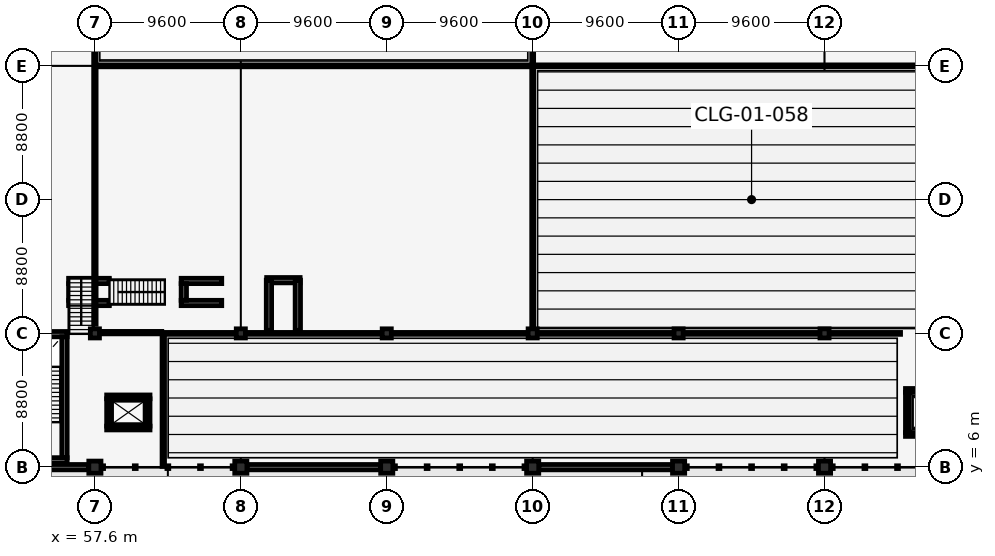
"""IFC4 building model, lengths in metres.
Left out: names, types, materials, properties, quantities, classifications, styles, units other than length and angle.
Written with IfcOpenShell. Run it as: python <this file> out.ifc"""

import sys

from ifc_helpers import new_model, si_unit, direction, frame, frame_2d, origin, origin_2d, place, context, subcontext, project, spatial, rectangle, extrude, element, fill, save


model = new_model("IFC4")
c1 = context("Model", 3, precision=1e-05, world=origin(), true_north=direction((0.0, 1.0)))
c2 = subcontext(c1, "Body", "Model", "MODEL_VIEW")
j1 = project(units=[si_unit("LENGTHUNIT", "METRE"), si_unit("PLANEANGLEUNIT", "RADIAN")], contexts=[c1])
p1 = place(None, origin())
s1 = spatial("IfcSite", under=j1, at=p1, CompositionType="ELEMENT")
p2 = place(p1, origin())
s2 = spatial("IfcBuilding", under=s1, at=p2, CompositionType="ELEMENT")
p3 = place(p2, origin())
s3 = spatial("IfcBuildingStorey", under=s2, at=p3, CompositionType="ELEMENT", Elevation=0.0)
p4 = place(p3, frame((57.6, 6.0, 0.0), z_axis=(0.0, 0.0, 1.0), x_axis=(1.0, 0.0, 0.0)))
e1 = element("IfcColumn", 1, at=p4, inside=s3, PredefinedType="COLUMN", context=c2, shape_type="SweptSolid", body=[
    extrude(rectangle(XDim=0.8, YDim=0.8, at=origin_2d()), origin(), (0.0, 0.0, 1.0), 4.8),
])
p5 = place(p3, frame((57.6, 14.8, 0.0), z_axis=(0.0, 0.0, 1.0), x_axis=(1.0, 0.0, 0.0)))
e2 = element("IfcColumn", 2, at=p5, inside=s3, PredefinedType="COLUMN", context=c2, shape_type="SweptSolid", body=[
    extrude(rectangle(XDim=0.6, YDim=0.6, at=origin_2d()), origin(), (0.0, 0.0, 1.0), 4.8),
])
p6 = place(p3, frame((67.2, 6.0, 0.0), z_axis=(0.0, 0.0, 1.0), x_axis=(1.0, 0.0, 0.0)))
e3 = element("IfcColumn", 3, at=p6, inside=s3, PredefinedType="COLUMN", context=c2, shape_type="SweptSolid", body=[
    extrude(rectangle(XDim=0.8, YDim=0.8, at=origin_2d()), origin(), (0.0, 0.0, 1.0), 4.8),
])
p7 = place(p3, frame((67.2, 14.8, 0.0), z_axis=(0.0, 0.0, 1.0), x_axis=(1.0, 0.0, 0.0)))
e4 = element("IfcColumn", 4, at=p7, inside=s3, PredefinedType="COLUMN", context=c2, shape_type="SweptSolid", body=[
    extrude(rectangle(XDim=0.6, YDim=0.6, at=origin_2d()), origin(), (0.0, 0.0, 1.0), 4.8),
])
p8 = place(p3, frame((76.8, 6.0, 0.0), z_axis=(0.0, 0.0, 1.0), x_axis=(1.0, 0.0, 0.0)))
e5 = element("IfcColumn", 5, at=p8, inside=s3, PredefinedType="COLUMN", context=c2, shape_type="SweptSolid", body=[
    extrude(rectangle(XDim=0.8, YDim=0.8, at=origin_2d()), origin(), (0.0, 0.0, 1.0), 4.8),
])
p9 = place(p3, frame((76.8, 14.8, 0.0), z_axis=(0.0, 0.0, 1.0), x_axis=(1.0, 0.0, 0.0)))
e6 = element("IfcColumn", 6, at=p9, inside=s3, PredefinedType="COLUMN", context=c2, shape_type="SweptSolid", body=[
    extrude(rectangle(XDim=0.6, YDim=0.6, at=origin_2d()), origin(), (0.0, 0.0, 1.0), 4.8),
])
p10 = place(p3, frame((86.4, 6.0, 0.0), z_axis=(0.0, 0.0, 1.0), x_axis=(1.0, 0.0, 0.0)))
e7 = element("IfcColumn", 7, at=p10, inside=s3, PredefinedType="COLUMN", context=c2, shape_type="SweptSolid", body=[
    extrude(rectangle(XDim=0.8, YDim=0.8, at=origin_2d()), origin(), (0.0, 0.0, 1.0), 4.8),
])
p11 = place(p3, frame((86.4, 14.8, 0.0), z_axis=(0.0, 0.0, 1.0), x_axis=(1.0, 0.0, 0.0)))
e8 = element("IfcColumn", 8, at=p11, inside=s3, PredefinedType="COLUMN", context=c2, shape_type="SweptSolid", body=[
    extrude(rectangle(XDim=0.6, YDim=0.6, at=origin_2d()), origin(), (0.0, 0.0, 1.0), 4.8),
])
p12 = place(p3, frame((96.0, 6.0, 0.0), z_axis=(0.0, 0.0, 1.0), x_axis=(1.0, 0.0, 0.0)))
e9 = element("IfcColumn", 9, at=p12, inside=s3, PredefinedType="COLUMN", context=c2, shape_type="SweptSolid", body=[
    extrude(rectangle(XDim=0.8, YDim=0.8, at=origin_2d()), origin(), (0.0, 0.0, 1.0), 4.8),
])
p13 = place(p3, frame((96.0, 14.8, 0.0), z_axis=(0.0, 0.0, 1.0), x_axis=(1.0, 0.0, 0.0)))
e10 = element("IfcColumn", 10, at=p13, inside=s3, PredefinedType="COLUMN", context=c2, shape_type="SweptSolid", body=[
    extrude(rectangle(XDim=0.6, YDim=0.6, at=origin_2d()), origin(), (0.0, 0.0, 1.0), 4.8),
])
p14 = place(p3, frame((105.6, 6.0, 0.0), z_axis=(0.0, 0.0, 1.0), x_axis=(1.0, 0.0, 0.0)))
e11 = element("IfcColumn", 11, at=p14, inside=s3, PredefinedType="COLUMN", context=c2, shape_type="SweptSolid", body=[
    extrude(rectangle(XDim=0.8, YDim=0.8, at=origin_2d()), origin(), (0.0, 0.0, 1.0), 4.8),
])
p15 = place(p3, frame((105.6, 14.8, 0.0), z_axis=(0.0, 0.0, 1.0), x_axis=(1.0, 0.0, 0.0)))
e12 = element("IfcColumn", 12, at=p15, inside=s3, PredefinedType="COLUMN", context=c2, shape_type="SweptSolid", body=[
    extrude(rectangle(XDim=0.6, YDim=0.6, at=origin_2d()), origin(), (0.0, 0.0, 1.0), 4.8),
])
p16 = place(p3, frame((48.4, 6.0, 0.0), z_axis=(0.0, 0.0, 1.0), x_axis=(1.0, 0.0, 0.0)))
e13 = element("IfcWall", 13, at=p16, inside=s3, PredefinedType="SOLIDWALL", context=c2, shape_type="SweptSolid", body=[
    extrude(rectangle(XDim=8.8, YDim=0.35, at=frame_2d((4.4, 0.0))), origin(), (0.0, 0.0, 1.0), 4.1),
])
p17 = place(p16, frame((3.2, 0.0, 1.0)))
e14 = element("IfcOpeningElement", 14, at=p17, cuts=e13, PredefinedType="OPENING", context=c2, shape_type="SweptSolid", body=[
    extrude(rectangle(XDim=2.06, YDim=1.97, at=frame_2d((1.03, 0.985))), frame((0.0, 0.185, 0.0), z_axis=(0.0, -1.0, 0.0), x_axis=(1.0, 0.0, 0.0)), (0.0, 0.0, 1.0), 0.37),
])
p18 = place(p3, frame((67.6, 6.0, 0.0), z_axis=(0.0, 0.0, 1.0), x_axis=(1.0, 0.0, 0.0)))
e15 = element("IfcWall", 15, at=p18, inside=s3, PredefinedType="SOLIDWALL", context=c2, shape_type="SweptSolid", body=[
    extrude(rectangle(XDim=8.8, YDim=0.35, at=frame_2d((4.4, 0.0))), origin(), (0.0, 0.0, 1.0), 4.1),
])
p19 = place(p18, frame((1.4, 0.0, 0.0)))
e16 = element("IfcOpeningElement", 16, at=p19, cuts=e15, PredefinedType="OPENING", context=c2, shape_type="SweptSolid", body=[
    extrude(rectangle(XDim=1.88, YDim=2.31, at=frame_2d((0.94, 1.155))), frame((0.0, 0.185, 0.0), z_axis=(0.0, -1.0, 0.0), x_axis=(1.0, 0.0, 0.0)), (0.0, 0.0, 1.0), 0.37),
])
p20 = place(p18, frame((4.8, 0.0, 0.0)))
e17 = element("IfcOpeningElement", 17, at=p20, cuts=e15, PredefinedType="OPENING", context=c2, shape_type="SweptSolid", body=[
    extrude(rectangle(XDim=2.0, YDim=2.4, at=frame_2d((1.0, 1.2))), frame((0.0, 0.185, 0.0), z_axis=(0.0, -1.0, 0.0), x_axis=(1.0, 0.0, 0.0)), (0.0, 0.0, 1.0), 0.37),
])
p21 = place(p3, frame((86.8, 6.0, 0.0), z_axis=(0.0, 0.0, 1.0), x_axis=(1.0, 0.0, 0.0)))
e18 = element("IfcWall", 18, at=p21, inside=s3, PredefinedType="SOLIDWALL", context=c2, shape_type="SweptSolid", body=[
    extrude(rectangle(XDim=8.8, YDim=0.35, at=frame_2d((4.4, 0.0))), origin(), (0.0, 0.0, 1.0), 4.1),
])
p22 = place(p21, frame((1.4, 0.0, 0.0)))
e19 = element("IfcOpeningElement", 19, at=p22, cuts=e18, PredefinedType="OPENING", context=c2, shape_type="SweptSolid", body=[
    extrude(rectangle(XDim=1.88, YDim=2.31, at=frame_2d((0.94, 1.155))), frame((0.0, 0.185, 0.0), z_axis=(0.0, -1.0, 0.0), x_axis=(1.0, 0.0, 0.0)), (0.0, 0.0, 1.0), 0.37),
])
p23 = place(p21, frame((4.8, 0.0, 0.0)))
e20 = element("IfcOpeningElement", 20, at=p23, cuts=e18, PredefinedType="OPENING", context=c2, shape_type="SweptSolid", body=[
    extrude(rectangle(XDim=2.0, YDim=2.4, at=frame_2d((1.0, 1.2))), frame((0.0, 0.185, 0.0), z_axis=(0.0, -1.0, 0.0), x_axis=(1.0, 0.0, 0.0)), (0.0, 0.0, 1.0), 0.37),
])
for number, where, z_axis, x_axis in (
    (21, (55.775, 6.45, 0.0), (0.0, 0.0, 1.0), (-1.0, 0.0, 0.0)),
    (22, (50.125, 14.75, 0.0), (0.0, 0.0, 1.0), (1.0, 0.0, 0.0)),
):
    element("IfcWall", number, at=place(p3, frame(where, z_axis=z_axis, x_axis=x_axis)), inside=s3, PredefinedType="SHEAR", context=c2, shape_type="SweptSolid", body=[
        extrude(rectangle(XDim=5.65, YDim=0.35, at=frame_2d((2.825, 0.0))), origin(), (0.0, 0.0, 1.0), 4.55),
    ])
p24 = place(p3, frame((55.6, 14.575, 0.0), z_axis=(0.0, 0.0, 1.0), x_axis=(0.0, -1.0, 0.0)))
e23 = element("IfcWall", 23, at=p24, inside=s3, PredefinedType="SHEAR", context=c2, shape_type="SweptSolid", body=[
    extrude(rectangle(XDim=7.95, YDim=0.35, at=frame_2d((3.975, 0.0))), origin(), (0.0, 0.0, 1.0), 4.55),
])
p25 = place(p24, frame((5.68, 0.0, 0.0)))
e24 = element("IfcOpeningElement", 24, at=p25, cuts=e23, PredefinedType="OPENING", context=c2, shape_type="SweptSolid", body=[
    extrude(rectangle(XDim=2.05, YDim=2.15, at=frame_2d((1.025, 1.075))), frame((0.0, 0.185, 0.0), z_axis=(0.0, -1.0, 0.0), x_axis=(1.0, 0.0, 0.0)), (0.0, 0.0, 1.0), 0.37),
])
for number, where, z_axis, x_axis in (
    (25, (55.875, 16.8, 0.0), (0.0, 0.0, 1.0), (1.0, 0.0, 0.0)),
    (26, (55.875, 18.25, 0.0), (0.0, 0.0, 1.0), (1.0, 0.0, 0.0)),
):
    element("IfcWall", number, at=place(p3, frame(where, z_axis=z_axis, x_axis=x_axis)), inside=s3, PredefinedType="SHEAR", context=c2, shape_type="SweptSolid", body=[
        extrude(rectangle(XDim=2.67, YDim=0.35, at=frame_2d((1.335, 0.0))), origin(), (0.0, 0.0, 1.0), 2.205),
    ])
p26 = place(p3, frame((56.05, 16.975, 0.0), z_axis=(0.0, 0.0, 1.0), x_axis=(0.0, 1.0, 0.0)))
e27 = element("IfcWall", 27, at=p26, inside=s3, PredefinedType="SHEAR", context=c2, shape_type="SweptSolid", body=[
    extrude(rectangle(XDim=1.1, YDim=0.35, at=frame_2d((0.55, 0.0))), origin(), (0.0, 0.0, 1.0), 2.205),
])
for number, where, z_axis, x_axis in (
    (28, (63.275, 16.8, 0.0), (0.0, 0.0, 1.0), (1.0, 0.0, 0.0)),
    (29, (63.275, 18.25, 0.0), (0.0, 0.0, 1.0), (1.0, 0.0, 0.0)),
):
    element("IfcWall", number, at=place(p3, frame(where, z_axis=z_axis, x_axis=x_axis)), inside=s3, PredefinedType="SHEAR", context=c2, shape_type="SweptSolid", body=[
        extrude(rectangle(XDim=2.67, YDim=0.35, at=frame_2d((1.335, 0.0))), origin(), (0.0, 0.0, 1.0), 4.8),
    ])
p27 = place(p3, frame((63.45, 16.975, 0.0), z_axis=(0.0, 0.0, 1.0), x_axis=(0.0, 1.0, 0.0)))
e30 = element("IfcWall", 30, at=p27, inside=s3, PredefinedType="SHEAR", context=c2, shape_type="SweptSolid", body=[
    extrude(rectangle(XDim=1.1, YDim=0.35, at=frame_2d((0.55, 0.0))), origin(), (0.0, 0.0, 1.0), 4.8),
])
p28 = place(p3, frame((68.9, 18.3, 0.0), z_axis=(0.0, 0.0, 1.0), x_axis=(1.0, 0.0, 0.0)))
e31 = element("IfcWall", 31, at=p28, inside=s3, PredefinedType="SHEAR", context=c2, shape_type="SweptSolid", body=[
    extrude(rectangle(XDim=2.2, YDim=0.35, at=frame_2d((1.1, 0.0))), origin(), (0.0, 0.0, 1.0), 4.55),
])
for number, where, z_axis, x_axis in (
    (32, (69.05, 15.0, 0.0), (0.0, 0.0, 1.0), (0.0, 1.0, 0.0)),
    (33, (70.95, 15.0, 0.0), (0.0, 0.0, 1.0), (0.0, 1.0, 0.0)),
):
    element("IfcWall", number, at=place(p3, frame(where, z_axis=z_axis, x_axis=x_axis)), inside=s3, PredefinedType="SHEAR", context=c2, shape_type="SweptSolid", body=[
        extrude(rectangle(XDim=3.3, YDim=0.35, at=frame_2d((1.65, 0.0))), origin(), (0.0, 0.0, 1.0), 4.55),
    ])
p29 = place(p3, frame((61.225, 8.575, 0.0), z_axis=(0.0, 0.0, 1.0), x_axis=(-1.0, 0.0, 0.0)))
e34 = element("IfcWall", 34, at=p29, inside=s3, PredefinedType="SOLIDWALL", context=c2, shape_type="SweptSolid", body=[
    extrude(rectangle(XDim=2.85, YDim=0.25, at=frame_2d((1.425, 0.0))), origin(), (0.0, 0.0, 1.0), 4.55),
])
p30 = place(p3, frame((58.375, 10.625, 0.0), z_axis=(0.0, 0.0, 1.0), x_axis=(1.0, 0.0, 0.0)))
e35 = element("IfcWall", 35, at=p30, inside=s3, PredefinedType="SOLIDWALL", context=c2, shape_type="SweptSolid", body=[
    extrude(rectangle(XDim=2.85, YDim=0.25, at=frame_2d((1.425, 0.0))), origin(), (0.0, 0.0, 1.0), 4.55),
])
p31 = place(p30, frame((0.875, 0.0, 0.0)))
e36 = element("IfcOpeningElement", 36, at=p31, cuts=e35, PredefinedType="OPENING", context=c2, shape_type="SweptSolid", body=[
    extrude(rectangle(XDim=1.1, YDim=2.15, at=frame_2d((0.55, 1.075))), frame((0.0, 0.135, 0.0), z_axis=(0.0, -1.0, 0.0), x_axis=(1.0, 0.0, 0.0)), (0.0, 0.0, 1.0), 0.27),
])
for number, where, z_axis, x_axis in (
    (37, (58.5, 8.7, 0.0), (0.0, 0.0, 1.0), (0.0, 1.0, 0.0)),
    (38, (61.1, 10.5, 0.0), (0.0, 0.0, 1.0), (0.0, -1.0, 0.0)),
):
    element("IfcWall", number, at=place(p3, frame(where, z_axis=z_axis, x_axis=x_axis)), inside=s3, PredefinedType="SOLIDWALL", context=c2, shape_type="SweptSolid", body=[
        extrude(rectangle(XDim=1.8, YDim=0.25, at=frame_2d((0.9, 0.0))), origin(), (0.0, 0.0, 1.0), 4.55),
    ])
p32 = place(p3, frame((114.275, 8.15, 0.0), z_axis=(0.0, 0.0, 1.0), x_axis=(-1.0, 0.0, 0.0)))
e39 = element("IfcWall", 39, at=p32, inside=s3, PredefinedType="SOLIDWALL", context=c2, shape_type="SweptSolid", body=[
    extrude(rectangle(XDim=3.35, YDim=0.25, at=frame_2d((1.675, 0.0))), origin(), (0.0, 0.0, 1.0), 4.55),
])
p33 = place(p3, frame((110.925, 11.05, 0.0), z_axis=(0.0, 0.0, 1.0), x_axis=(1.0, 0.0, 0.0)))
e40 = element("IfcWall", 40, at=p33, inside=s3, PredefinedType="SOLIDWALL", context=c2, shape_type="SweptSolid", body=[
    extrude(rectangle(XDim=3.35, YDim=0.25, at=frame_2d((1.675, 0.0))), origin(), (0.0, 0.0, 1.0), 4.55),
])
p34 = place(p33, frame((0.775, 0.0, 0.0)))
e41 = element("IfcOpeningElement", 41, at=p34, cuts=e40, PredefinedType="OPENING", context=c2, shape_type="SweptSolid", body=[
    extrude(rectangle(XDim=1.8, YDim=2.3, at=frame_2d((0.9, 1.15))), frame((0.0, 0.135, 0.0), z_axis=(0.0, -1.0, 0.0), x_axis=(1.0, 0.0, 0.0)), (0.0, 0.0, 1.0), 0.27),
])
p35 = place(p3, frame((111.05, 8.275, 0.0), z_axis=(0.0, 0.0, 1.0), x_axis=(0.0, 1.0, 0.0)))
e42 = element("IfcWall", 42, at=p35, inside=s3, PredefinedType="SOLIDWALL", context=c2, shape_type="SweptSolid", body=[
    extrude(rectangle(XDim=2.65, YDim=0.25, at=frame_2d((1.325, 0.0))), origin(), (0.0, 0.0, 1.0), 4.55),
])
p36 = place(p3, frame((86.4, 14.9, 0.0), z_axis=(0.0, 0.0, 1.0), x_axis=(0.0, 1.0, 0.0)))
e43 = element("IfcWall", 43, at=p36, inside=s3, PredefinedType="PARTITIONING", context=c2, shape_type="SweptSolid", body=[
    extrude(rectangle(XDim=17.4, YDim=0.125, at=frame_2d((8.7, 0.0))), origin(), (0.0, 0.0, 1.0), 4.42),
])
p37 = place(p3, frame((57.7, 32.4, 0.0), z_axis=(0.0, 0.0, 1.0), x_axis=(1.0, 0.0, 0.0)))
e44 = element("IfcWall", 44, at=p37, inside=s3, PredefinedType="PARTITIONING", context=c2, shape_type="SweptSolid", body=[
    extrude(rectangle(XDim=28.6, YDim=0.125, at=frame_2d((14.3, 0.0))), origin(), (0.0, 0.0, 1.0), 4.42),
])
p38 = place(p3, frame((62.2, 14.8, 0.0), z_axis=(0.0, 0.0, 1.0), x_axis=(1.0, 0.0, 0.0)))
e45 = element("IfcWall", 45, at=p38, inside=s3, PredefinedType="PARTITIONING", context=c2, shape_type="SweptSolid", body=[
    extrude(rectangle(XDim=24.1, YDim=0.125, at=frame_2d((12.05, 0.0))), origin(), (0.0, 0.0, 1.0), 3.925),
])
p39 = place(p3, frame((57.6, 15.4, 0.0), z_axis=(0.0, 0.0, 1.0), x_axis=(0.0, 1.0, 0.0)))
e46 = element("IfcWall", 46, at=p39, inside=s3, PredefinedType="PARTITIONING", context=c2, shape_type="SweptSolid", body=[
    extrude(rectangle(XDim=16.9, YDim=0.16, at=frame_2d((8.45, 0.0))), origin(), (0.0, 0.0, 1.0), 4.42),
])
p40 = place(p39, frame((7.55, 0.0, 0.0)))
e47 = element("IfcOpeningElement", 47, at=p40, cuts=e46, PredefinedType="OPENING", context=c2, shape_type="SweptSolid", body=[
    extrude(rectangle(XDim=1.8, YDim=2.15, at=frame_2d((0.9, 1.075))), frame((0.0, 0.09, 0.0), z_axis=(0.0, -1.0, 0.0), x_axis=(1.0, 0.0, 0.0)), (0.0, 0.0, 1.0), 0.18),
])
p41 = place(p3, frame((57.7, 14.85, 0.0), z_axis=(0.0, 0.0, 1.0), x_axis=(1.0, 0.0, 0.0)))
e48 = element("IfcWall", 48, at=p41, inside=s3, PredefinedType="PARTITIONING", context=c2, shape_type="SweptSolid", body=[
    extrude(rectangle(XDim=4.3, YDim=0.16, at=frame_2d((2.15, 0.0))), origin(), (0.0, 0.0, 1.0), 3.925),
])
p42 = place(p41, frame((1.25, 0.0, 0.0)))
e49 = element("IfcOpeningElement", 49, at=p42, cuts=e48, PredefinedType="OPENING", context=c2, shape_type="SweptSolid", body=[
    extrude(rectangle(XDim=1.8, YDim=2.15, at=frame_2d((0.9, 1.075))), frame((0.0, 0.09, 0.0), z_axis=(0.0, -1.0, 0.0), x_axis=(1.0, 0.0, 0.0)), (0.0, 0.0, 1.0), 0.18),
])
p43 = place(p3, frame((86.5, 32.4, 0.0), z_axis=(0.0, 0.0, 1.0), x_axis=(1.0, 0.0, 0.0)))
e50 = element("IfcWall", 50, at=p43, inside=s3, PredefinedType="PARTITIONING", context=c2, shape_type="SweptSolid", body=[
    extrude(rectangle(XDim=28.65, YDim=0.125, at=frame_2d((14.325, 0.0))), origin(), (0.0, 0.0, 1.0), 4.42),
])
p44 = place(p3, frame((86.5, 14.8, 0.0), z_axis=(0.0, 0.0, 1.0), x_axis=(1.0, 0.0, 0.0)))
e51 = element("IfcWall", 51, at=p44, inside=s3, PredefinedType="PARTITIONING", context=c2, shape_type="SweptSolid", body=[
    extrude(rectangle(XDim=24.1, YDim=0.125, at=frame_2d((12.05, 0.0))), origin(), (0.0, 0.0, 1.0), 3.925),
])
p45 = place(p3, frame((86.4, 32.5, 0.0), z_axis=(0.0, 0.0, 1.0), x_axis=(0.0, 1.0, 0.0)))
e52 = element("IfcWall", 52, at=p45, inside=s3, PredefinedType="PARTITIONING", context=c2, shape_type="SweptSolid", body=[
    extrude(rectangle(XDim=17.45, YDim=0.125, at=frame_2d((8.725, 0.0))), origin(), (0.0, 0.0, 1.0), 4.42),
])
p46 = place(p3, frame((57.6, 32.5, 0.0), z_axis=(0.0, 0.0, 1.0), x_axis=(0.0, 1.0, 0.0)))
e53 = element("IfcWall", 53, at=p46, inside=s3, PredefinedType="PARTITIONING", context=c2, shape_type="SweptSolid", body=[
    extrude(rectangle(XDim=17.45, YDim=0.16, at=frame_2d((8.725, 0.0))), origin(), (0.0, 0.0, 1.0), 4.42),
])
p47 = place(p46, frame((7.825, 0.0, 0.0)))
e54 = element("IfcOpeningElement", 54, at=p47, cuts=e53, PredefinedType="OPENING", context=c2, shape_type="SweptSolid", body=[
    extrude(rectangle(XDim=1.8, YDim=2.15, at=frame_2d((0.9, 1.075))), frame((0.0, 0.09, 0.0), z_axis=(0.0, -1.0, 0.0), x_axis=(1.0, 0.0, 0.0)), (0.0, 0.0, 1.0), 0.18),
])
p48 = place(p3, frame((62.1, 6.05, 0.0), z_axis=(0.0, 0.0, 1.0), x_axis=(0.0, 1.0, 0.0)))
e55 = element("IfcWall", 55, at=p48, inside=s3, PredefinedType="PARTITIONING", context=c2, shape_type="SweptSolid", body=[
    extrude(rectangle(XDim=8.65, YDim=0.16, at=frame_2d((4.325, 0.0))), origin(), (0.0, 0.0, 1.0), 4.42),
])
p49 = place(p48, frame((3.732, 0.0, 0.0)))
e56 = element("IfcOpeningElement", 56, at=p49, cuts=e55, PredefinedType="OPENING", context=c2, shape_type="SweptSolid", body=[
    extrude(rectangle(XDim=1.8, YDim=2.15, at=frame_2d((0.9, 1.075))), frame((0.0, 0.09, 0.0), z_axis=(0.0, -1.0, 0.0), x_axis=(1.0, 0.0, 0.0)), (0.0, 0.0, 1.0), 0.18),
])
p50 = place(p19, origin())
e57 = element("IfcDoor", 57, at=p50, inside=s3, OperationType="DOUBLE_DOOR_SINGLE_SWING", PredefinedType="DOOR", context=c2, shape_type="SweptSolid", body=[
    extrude(rectangle(XDim=1.88, YDim=2.31, at=frame_2d((0.94, 1.155))), frame((0.0, 0.025, 0.0), z_axis=(0.0, -1.0, 0.0), x_axis=(1.0, 0.0, 0.0)), (0.0, 0.0, 1.0), 0.05),
])
fill(e16, e57)
p51 = place(p20, origin())
e58 = element("IfcDoor", 58, at=p51, inside=s3, OperationType="DOUBLE_DOOR_SINGLE_SWING", PredefinedType="DOOR", context=c2, shape_type="SweptSolid", body=[
    extrude(rectangle(XDim=2.0, YDim=2.4, at=frame_2d((1.0, 1.2))), frame((0.0, 0.025, 0.0), z_axis=(0.0, -1.0, 0.0), x_axis=(1.0, 0.0, 0.0)), (0.0, 0.0, 1.0), 0.05),
])
fill(e17, e58)
p52 = place(p22, origin())
e59 = element("IfcDoor", 59, at=p52, inside=s3, OperationType="DOUBLE_DOOR_SINGLE_SWING", PredefinedType="DOOR", context=c2, shape_type="SweptSolid", body=[
    extrude(rectangle(XDim=1.88, YDim=2.31, at=frame_2d((0.94, 1.155))), frame((0.0, 0.025, 0.0), z_axis=(0.0, -1.0, 0.0), x_axis=(1.0, 0.0, 0.0)), (0.0, 0.0, 1.0), 0.05),
])
fill(e19, e59)
p53 = place(p23, origin())
e60 = element("IfcDoor", 60, at=p53, inside=s3, OperationType="DOUBLE_DOOR_SINGLE_SWING", PredefinedType="DOOR", context=c2, shape_type="SweptSolid", body=[
    extrude(rectangle(XDim=2.0, YDim=2.4, at=frame_2d((1.0, 1.2))), frame((0.0, 0.025, 0.0), z_axis=(0.0, -1.0, 0.0), x_axis=(1.0, 0.0, 0.0)), (0.0, 0.0, 1.0), 0.05),
])
fill(e20, e60)
p54 = place(p25, origin())
e61 = element("IfcDoor", 61, at=p54, inside=s3, OperationType="DOUBLE_DOOR_SINGLE_SWING", PredefinedType="DOOR", context=c2, shape_type="SweptSolid", body=[
    extrude(rectangle(XDim=2.05, YDim=2.15, at=frame_2d((1.025, 1.075))), frame((0.0, 0.025, 0.0), z_axis=(0.0, -1.0, 0.0), x_axis=(1.0, 0.0, 0.0)), (0.0, 0.0, 1.0), 0.05),
])
fill(e24, e61)
p55 = place(p31, origin())
e62 = element("IfcDoor", 62, at=p55, inside=s3, OperationType="DOUBLE_DOOR_SLIDING", PredefinedType="DOOR", context=c2, shape_type="SweptSolid", body=[
    extrude(rectangle(XDim=1.1, YDim=2.15, at=frame_2d((0.55, 1.075))), frame((0.0, 0.025, 0.0), z_axis=(0.0, -1.0, 0.0), x_axis=(1.0, 0.0, 0.0)), (0.0, 0.0, 1.0), 0.05),
])
fill(e36, e62)
p56 = place(p40, origin())
e63 = element("IfcDoor", 63, at=p56, inside=s3, OperationType="DOUBLE_DOOR_SINGLE_SWING", PredefinedType="DOOR", context=c2, shape_type="SweptSolid", body=[
    extrude(rectangle(XDim=1.8, YDim=2.15, at=frame_2d((0.9, 1.075))), frame((0.0, 0.025, 0.0), z_axis=(0.0, -1.0, 0.0), x_axis=(1.0, 0.0, 0.0)), (0.0, 0.0, 1.0), 0.05),
])
fill(e47, e63)
p57 = place(p42, origin())
e64 = element("IfcDoor", 64, at=p57, inside=s3, OperationType="DOUBLE_DOOR_SINGLE_SWING", PredefinedType="DOOR", context=c2, shape_type="SweptSolid", body=[
    extrude(rectangle(XDim=1.8, YDim=2.15, at=frame_2d((0.9, 1.075))), frame((0.0, 0.025, 0.0), z_axis=(0.0, -1.0, 0.0), x_axis=(1.0, 0.0, 0.0)), (0.0, 0.0, 1.0), 0.05),
])
fill(e49, e64)
p58 = place(p49, origin())
e65 = element("IfcDoor", 65, at=p58, inside=s3, OperationType="DOUBLE_DOOR_SINGLE_SWING", PredefinedType="DOOR", context=c2, shape_type="SweptSolid", body=[
    extrude(rectangle(XDim=1.8, YDim=2.15, at=frame_2d((0.9, 1.075))), frame((0.0, 0.025, 0.0), z_axis=(0.0, -1.0, 0.0), x_axis=(1.0, 0.0, 0.0)), (0.0, 0.0, 1.0), 0.05),
])
fill(e56, e65)
save(model, sys.argv[1])
